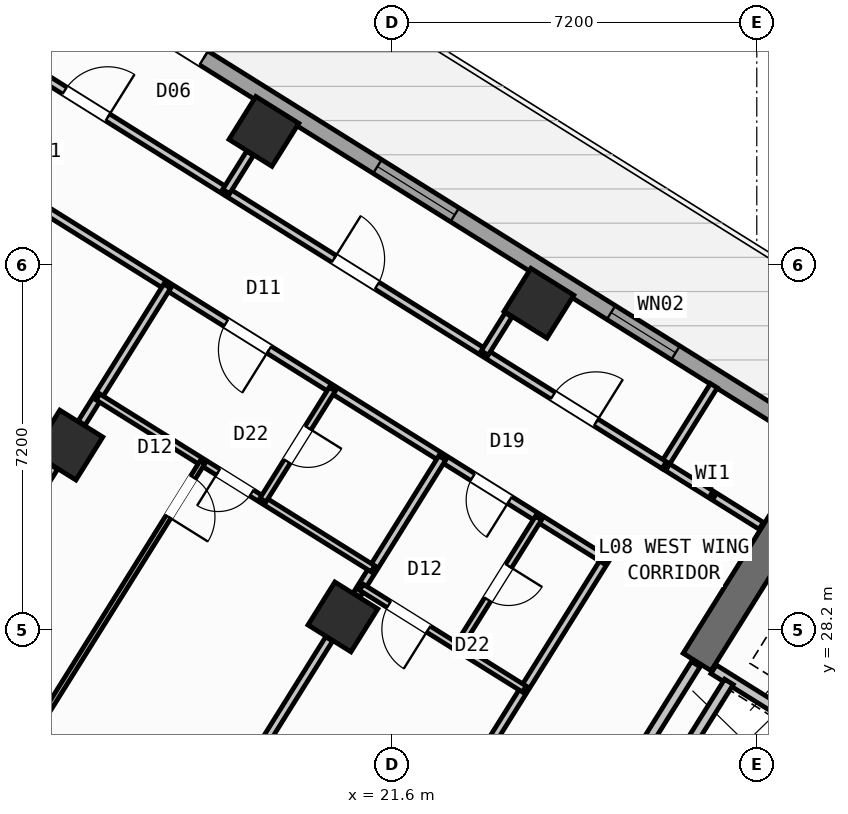
"""IFC4 building model, lengths in metres.
Left out: names, types, materials, properties, quantities, classifications, styles, units other than length and angle.
Written with IfcOpenShell. Run it as: python <this file> out.ifc"""

import sys

from ifc_helpers import new_model, si_unit, direction, frame, frame_2d, origin, origin_2d, place, context, subcontext, project, spatial, rectangle, hollow_rectangle, extrude, source, transform, mapped, element, fill, save


model = new_model("IFC4")
c1 = context("Model", 3, precision=1e-05, world=origin(), true_north=direction((0.0, 1.0)))
c2 = subcontext(c1, "Body", "Model", "MODEL_VIEW")
j1 = project(units=[si_unit("LENGTHUNIT", "METRE"), si_unit("PLANEANGLEUNIT", "RADIAN")], contexts=[c1])
p1 = place(None, origin())
s1 = spatial("IfcSite", under=j1, at=p1, CompositionType="ELEMENT")
p2 = place(p1, origin())
s2 = spatial("IfcBuilding", under=s1, at=p2, CompositionType="ELEMENT")
p3 = place(p2, frame((0.0, 0.0, 34.8)))
s3 = spatial("IfcBuildingStorey", under=s2, at=p3, CompositionType="ELEMENT", Elevation=34.8)
p4 = place(p3, frame((29.491, 30.552, 0.0), z_axis=(0.0, 0.0, 1.0), x_axis=(-0.529893103397, -0.8480644427, 0.0)))
e1 = element("IfcWall", 1, at=p4, inside=s3, PredefinedType="SHEAR", context=c2, shape_type="SweptSolid", body=[
    extrude(rectangle(XDim=3.525, YDim=0.65, at=frame_2d((1.763, 0.0))), origin(), (0.0, 0.0, 1.0), 3.35),
])
m1 = source(origin(), c2, "Body", "SweptSolid", [
    extrude(hollow_rectangle(XDim=1.0, YDim=1.0, WallThickness=0.04, at=origin_2d()), origin(), (0.0, 0.0, 1.0), 3.6),
])
for number, where, z_axis, x_axis in (
    (2, (24.5, 34.643, 0.0), (0.0, 0.0, 1.0), (-0.848, 0.53, 0.0)),
    (3, (20.632, 28.452, 0.0), (0.0, 0.0, 1.0), (-0.848, 0.53, 0.0)),
    (4, (19.073, 38.034, 0.0), (0.0, 0.0, 1.0), (-0.848, 0.53, 0.0)),
    (5, (15.205, 31.844, 0.0), (0.0, 0.0, 1.0), (-0.848, 0.53, 0.0)),
):
    element("IfcColumn", number, at=place(p3, frame(where, z_axis=z_axis, x_axis=x_axis)), inside=s3, PredefinedType="COLUMN", context=c2, shape_type="MappedRepresentation", body=[
        mapped(m1, transform((0.0, 0.0, 0.0), scale=1.0)),
    ])
p5 = place(p3, frame((14.138, 41.825, 0.0), z_axis=(0.0, 0.0, 1.0), x_axis=(0.848046498049, -0.529921821731, 0.0)))
e6 = element("IfcWall", 6, at=p5, inside=s3, PredefinedType="STANDARD", context=c2, shape_type="SweptSolid", body=[
    extrude(rectangle(XDim=31.588, YDim=0.32, at=frame_2d((15.794, 0.0))), origin(), (0.0, 0.0, 1.0), 3.35),
])
p6 = place(p5, frame((3.369, 0.0, 0.0)))
e7 = element("IfcOpeningElement", 7, at=p6, cuts=e6, PredefinedType="OPENING", context=c2, shape_type="SweptSolid", body=[
    extrude(rectangle(XDim=1.05, YDim=2.15, at=frame_2d((0.525, 1.075))), frame((0.0, 0.17, 0.0), z_axis=(0.0, -1.0, 0.0), x_axis=(1.0, 0.0, 0.0)), (0.0, 0.0, 1.0), 0.34),
])
p7 = place(p5, frame((0.946, 0.0, 0.85)))
e8 = element("IfcOpeningElement", 8, at=p7, cuts=e6, PredefinedType="OPENING", context=c2, shape_type="SweptSolid", body=[
    extrude(rectangle(XDim=1.8, YDim=1.5, at=frame_2d((0.9, 0.75))), frame((0.0, 0.17, 0.0), z_axis=(0.0, -1.0, 0.0), x_axis=(1.0, 0.0, 0.0)), (0.0, 0.0, 1.0), 0.34),
])
p8 = place(p5, frame((8.46, 0.0, 0.85)))
e9 = element("IfcOpeningElement", 9, at=p8, cuts=e6, PredefinedType="OPENING", context=c2, shape_type="SweptSolid", body=[
    extrude(rectangle(XDim=1.8, YDim=1.5, at=frame_2d((0.9, 0.75))), frame((0.0, 0.17, 0.0), z_axis=(0.0, -1.0, 0.0), x_axis=(1.0, 0.0, 0.0)), (0.0, 0.0, 1.0), 0.34),
])
p9 = place(p5, frame((13.899, 0.0, 0.85)))
e10 = element("IfcOpeningElement", 10, at=p9, cuts=e6, PredefinedType="OPENING", context=c2, shape_type="SweptSolid", body=[
    extrude(rectangle(XDim=1.5, YDim=1.5, at=frame_2d((0.75, 0.75))), frame((0.0, 0.17, 0.0), z_axis=(0.0, -1.0, 0.0), x_axis=(1.0, 0.0, 0.0)), (0.0, 0.0, 1.0), 0.34),
])
p10 = place(p5, frame((22.019, 0.0, 0.95)))
e11 = element("IfcOpeningElement", 11, at=p10, cuts=e6, PredefinedType="OPENING", context=c2, shape_type="SweptSolid", body=[
    extrude(rectangle(XDim=1.2, YDim=1.4, at=frame_2d((0.6, 0.7))), frame((0.0, 0.17, 0.0), z_axis=(0.0, -1.0, 0.0), x_axis=(1.0, 0.0, 0.0)), (0.0, 0.0, 1.0), 0.34),
])
p11 = place(p5, frame((27.569, 0.0, 0.95)))
e12 = element("IfcOpeningElement", 12, at=p11, cuts=e6, PredefinedType="OPENING", context=c2, shape_type="SweptSolid", body=[
    extrude(rectangle(XDim=1.2, YDim=1.4, at=frame_2d((0.6, 0.7))), frame((0.0, 0.17, 0.0), z_axis=(0.0, -1.0, 0.0), x_axis=(1.0, 0.0, 0.0)), (0.0, 0.0, 1.0), 0.34),
])
p12 = place(p3, frame((31.822, 24.998, 0.0), z_axis=(0.0, 0.0, 1.0), x_axis=(-0.848058348634, 0.529902856485, 0.0)))
e13 = element("IfcWall", 13, at=p12, inside=s3, PredefinedType="STANDARD", context=c2, shape_type="SweptSolid", body=[
    extrude(rectangle(XDim=4.568, YDim=0.2, at=frame_2d((2.284, 0.0))), origin(), (0.0, 0.0, 1.0), 3.34),
])
p13 = place(p3, frame((28.25, 27.17, 0.0), z_axis=(0.0, 0.0, 1.0), x_axis=(-0.529905827651, -0.848056492117, 0.0)))
e14 = element("IfcWall", 14, at=p13, inside=s3, PredefinedType="STANDARD", context=c2, shape_type="SweptSolid", body=[
    extrude(rectangle(XDim=1.65, YDim=0.2, at=frame_2d((0.825, 0.0))), origin(), (0.0, 0.0, 1.0), 3.34),
])
p14 = place(p3, frame((29.801, 26.142, 0.0), z_axis=(0.0, 0.0, 1.0), x_axis=(-0.529998940003, -0.847998304005, 0.0)))
e15 = element("IfcWall", 15, at=p14, inside=s3, PredefinedType="STANDARD", context=c2, shape_type="SweptSolid", body=[
    extrude(rectangle(XDim=1.58, YDim=0.2, at=frame_2d((0.79, 0.0))), origin(), (0.0, 0.0, 1.0), 3.34),
])
p15 = place(p3, frame((27.596, 27.52, 0.0), z_axis=(0.0, 0.0, 1.0), x_axis=(-0.529865479138, -0.848081702443, 0.0)))
e16 = element("IfcWall", 16, at=p15, inside=s3, PredefinedType="STANDARD", context=c2, shape_type="SweptSolid", body=[
    extrude(rectangle(XDim=2.96, YDim=0.2, at=frame_2d((1.48, 0.0))), origin(), (0.0, 0.0, 1.0), 3.34),
])
p16 = place(p15, frame((1.76, 0.0, 0.0)))
e17 = element("IfcOpeningElement", 17, at=p16, cuts=e16, PredefinedType="OPENING", context=c2, shape_type="SweptSolid", body=[
    extrude(rectangle(XDim=0.86, YDim=2.05, at=frame_2d((0.43, 1.025))), frame((0.0, 0.11, 0.0), z_axis=(0.0, -1.0, 0.0), x_axis=(1.0, 0.0, 0.0)), (0.0, 0.0, 1.0), 0.22),
])
p17 = place(p3, frame((28.887, 30.251, 0.0), z_axis=(0.0, 0.0, 1.0), x_axis=(-0.848040823168, 0.52993090327, 0.0)))
e18 = element("IfcWall", 18, at=p17, inside=s3, PredefinedType="PARTITIONING", context=c2, shape_type="SweptSolid", body=[
    extrude(rectangle(XDim=2.258, YDim=0.16, at=frame_2d((1.129, 0.0))), origin(), (0.0, 0.0, 1.0), 3.34),
])
p18 = place(p3, frame((27.953, 33.016, 0.0), z_axis=(0.0, 0.0, 1.0), x_axis=(-0.529880305451, -0.848072439061, 0.0)))
e19 = element("IfcWall", 19, at=p18, inside=s3, PredefinedType="PARTITIONING", context=c2, shape_type="SweptSolid", body=[
    extrude(rectangle(XDim=1.85, YDim=0.16, at=frame_2d((0.925, 0.0))), origin(), (0.0, 0.0, 1.0), 3.34),
])
p19 = place(p3, frame((25.807, 29.582, 0.0), z_axis=(0.0, 0.0, 1.0), x_axis=(-0.529918119251, -0.84804881162, 0.0)))
e20 = element("IfcWall", 20, at=p19, inside=s3, PredefinedType="PARTITIONING", context=c2, shape_type="SweptSolid", body=[
    extrude(rectangle(XDim=17.65, YDim=0.16, at=frame_2d((8.825, 0.0))), origin(), (0.0, 0.0, 1.0), 3.34),
])
p20 = place(p3, frame((26.973, 31.447, 0.0), z_axis=(0.0, 0.0, 1.0), x_axis=(-0.848048310262, 0.529918921593, 0.0)))
e21 = element("IfcWall", 21, at=p20, inside=s3, PredefinedType="PARTITIONING", context=c2, shape_type="SweptSolid", body=[
    extrude(rectangle(XDim=16.73, YDim=0.16, at=frame_2d((8.365, 0.0))), origin(), (0.0, 0.0, 1.0), 3.34),
])
p21 = place(p20, frame((1.588, 0.0, 0.0)))
e22 = element("IfcOpeningElement", 22, at=p21, cuts=e21, PredefinedType="OPENING", context=c2, shape_type="SweptSolid", body=[
    extrude(rectangle(XDim=1.0, YDim=2.1, at=frame_2d((0.5, 1.05))), frame((0.0, 0.09, 0.0), z_axis=(0.0, -1.0, 0.0), x_axis=(1.0, 0.0, 0.0)), (0.0, 0.0, 1.0), 0.18),
])
p22 = place(p20, frame((6.685, 0.0, 0.0)))
e23 = element("IfcOpeningElement", 23, at=p22, cuts=e21, PredefinedType="OPENING", context=c2, shape_type="SweptSolid", body=[
    extrude(rectangle(XDim=1.0, YDim=2.1, at=frame_2d((0.5, 1.05))), frame((0.0, 0.09, 0.0), z_axis=(0.0, -1.0, 0.0), x_axis=(1.0, 0.0, 0.0)), (0.0, 0.0, 1.0), 0.18),
])
p23 = place(p20, frame((12.951, 0.0, 0.0)))
e24 = element("IfcOpeningElement", 24, at=p23, cuts=e21, PredefinedType="OPENING", context=c2, shape_type="SweptSolid", body=[
    extrude(rectangle(XDim=1.0, YDim=2.1, at=frame_2d((0.5, 1.05))), frame((0.0, 0.09, 0.0), z_axis=(0.0, -1.0, 0.0), x_axis=(1.0, 0.0, 0.0)), (0.0, 0.0, 1.0), 0.18),
])
p24 = place(p3, frame((25.807, 29.582, 0.0), z_axis=(0.0, 0.0, 1.0), x_axis=(-0.848052408131, 0.529912363569, 0.0)))
e25 = element("IfcWall", 25, at=p24, inside=s3, PredefinedType="PARTITIONING", context=c2, shape_type="SweptSolid", body=[
    extrude(rectangle(XDim=16.73, YDim=0.16, at=frame_2d((8.365, 0.0))), origin(), (0.0, 0.0, 1.0), 3.34),
])
p25 = place(p24, frame((2.22, 0.0, 0.0)))
e26 = element("IfcOpeningElement", 26, at=p25, cuts=e25, PredefinedType="OPENING", context=c2, shape_type="SweptSolid", body=[
    extrude(rectangle(XDim=0.86, YDim=2.05, at=frame_2d((0.43, 1.025))), frame((0.0, 0.09, 0.0), z_axis=(0.0, -1.0, 0.0), x_axis=(1.0, 0.0, 0.0)), (0.0, 0.0, 1.0), 0.18),
])
p26 = place(p24, frame((7.82, 0.0, 0.0)))
e27 = element("IfcOpeningElement", 27, at=p26, cuts=e25, PredefinedType="OPENING", context=c2, shape_type="SweptSolid", body=[
    extrude(rectangle(XDim=1.0, YDim=2.1, at=frame_2d((0.5, 1.05))), frame((0.0, 0.09, 0.0), z_axis=(0.0, -1.0, 0.0), x_axis=(1.0, 0.0, 0.0)), (0.0, 0.0, 1.0), 0.18),
])
p27 = place(p24, frame((12.95, 0.0, 0.0)))
e28 = element("IfcOpeningElement", 28, at=p27, cuts=e25, PredefinedType="OPENING", context=c2, shape_type="SweptSolid", body=[
    extrude(rectangle(XDim=1.0, YDim=2.1, at=frame_2d((0.5, 1.05))), frame((0.0, 0.09, 0.0), z_axis=(0.0, -1.0, 0.0), x_axis=(1.0, 0.0, 0.0)), (0.0, 0.0, 1.0), 0.18),
])
p28 = place(p3, frame((22.593, 31.59, 0.0), z_axis=(0.0, 0.0, 1.0), x_axis=(-0.529930102756, -0.848041323399, 0.0)))
e29 = element("IfcWall", 29, at=p28, inside=s3, PredefinedType="PARTITIONING", context=c2, shape_type="SweptSolid", body=[
    extrude(rectangle(XDim=3.188, YDim=0.16, at=frame_2d((1.594, 0.0))), origin(), (0.0, 0.0, 1.0), 2.725),
])
p29 = place(p3, frame((20.361, 28.018, 0.0), z_axis=(0.0, 0.0, 1.0), x_axis=(-0.529915015264, -0.848050751193, 0.0)))
e30 = element("IfcWall", 30, at=p29, inside=s3, PredefinedType="PARTITIONING", context=c2, shape_type="SweptSolid", body=[
    extrude(rectangle(XDim=6.276, YDim=0.16, at=frame_2d((3.138, 0.0))), origin(), (0.0, 0.0, 1.0), 2.725),
])
p30 = place(p3, frame((24.212, 27.029, 0.0), z_axis=(0.0, 0.0, 1.0), x_axis=(-0.84803087207, 0.529946827537, 0.0)))
e31 = element("IfcWall", 31, at=p30, inside=s3, PredefinedType="PLUMBINGWALL", context=c2, shape_type="SweptSolid", body=[
    extrude(rectangle(XDim=3.79, YDim=0.14, at=frame_2d((1.895, 0.0))), origin(), (0.0, 0.0, 1.0), 3.34),
])
p31 = place(p30, frame((2.23, 0.0, 0.0)))
e32 = element("IfcOpeningElement", 32, at=p31, cuts=e31, PredefinedType="OPENING", context=c2, shape_type="SweptSolid", body=[
    extrude(rectangle(XDim=0.92, YDim=2.08, at=frame_2d((0.46, 1.04))), frame((0.0, 0.08, 0.0), z_axis=(0.0, -1.0, 0.0), x_axis=(1.0, 0.0, 0.0)), (0.0, 0.0, 1.0), 0.16),
])
p32 = place(p3, frame((24.492, 30.403, 0.0), z_axis=(0.0, 0.0, 1.0), x_axis=(-0.529977067289, -0.848011974059, 0.0)))
e33 = element("IfcWall", 33, at=p32, inside=s3, PredefinedType="PLUMBINGWALL", context=c2, shape_type="SweptSolid", body=[
    extrude(rectangle(XDim=3.01, YDim=0.14, at=frame_2d((1.505, 0.0))), origin(), (0.0, 0.0, 1.0), 2.995),
])
p33 = place(p32, frame((1.115, 0.0, 0.0)))
e34 = element("IfcOpeningElement", 34, at=p33, cuts=e33, PredefinedType="OPENING", context=c2, shape_type="SweptSolid", body=[
    extrude(rectangle(XDim=0.78, YDim=2.05, at=frame_2d((0.39, 1.025))), frame((0.0, 0.08, 0.0), z_axis=(0.0, -1.0, 0.0), x_axis=(1.0, 0.0, 0.0)), (0.0, 0.0, 1.0), 0.16),
])
p34 = place(p3, frame((17.165, 34.981, 0.0), z_axis=(0.0, 0.0, 1.0), x_axis=(-0.529930102756, -0.848041323399, 0.0)))
e35 = element("IfcWall", 35, at=p34, inside=s3, PredefinedType="PARTITIONING", context=c2, shape_type="SweptSolid", body=[
    extrude(rectangle(XDim=3.188, YDim=0.16, at=frame_2d((1.594, 0.0))), origin(), (0.0, 0.0, 1.0), 2.725),
])
p35 = place(p3, frame((14.933, 31.409, 0.0), z_axis=(0.0, 0.0, 1.0), x_axis=(-0.529897533635, -0.848061674554, 0.0)))
e36 = element("IfcWall", 36, at=p35, inside=s3, PredefinedType="PARTITIONING", context=c2, shape_type="SweptSolid", body=[
    extrude(rectangle(XDim=6.276, YDim=0.16, at=frame_2d((3.138, 0.0))), origin(), (0.0, 0.0, 1.0), 2.725),
])
p36 = place(p3, frame((21.226, 29.402, 0.0), z_axis=(0.0, 0.0, 1.0), x_axis=(-0.848039019877, 0.529933789039, 0.0)))
e37 = element("IfcWall", 37, at=p36, inside=s3, PredefinedType="PLUMBINGWALL", context=c2, shape_type="SweptSolid", body=[
    extrude(rectangle(XDim=6.4, YDim=0.14, at=frame_2d((3.2, 0.0))), origin(), (0.0, 0.0, 1.0), 3.34),
])
p37 = place(p36, frame((2.824, 0.0, 0.0)))
e38 = element("IfcOpeningElement", 38, at=p37, cuts=e37, PredefinedType="OPENING", context=c2, shape_type="SweptSolid", body=[
    extrude(rectangle(XDim=0.78, YDim=2.05, at=frame_2d((0.39, 1.025))), frame((0.0, 0.08, 0.0), z_axis=(0.0, -1.0, 0.0), x_axis=(1.0, 0.0, 0.0)), (0.0, 0.0, 1.0), 0.16),
])
p38 = place(p3, frame((20.422, 32.947, 0.0), z_axis=(0.0, 0.0, 1.0), x_axis=(-0.529913878929, -0.848051461244, 0.0)))
e39 = element("IfcWall", 39, at=p38, inside=s3, PredefinedType="PLUMBINGWALL", context=c2, shape_type="SweptSolid", body=[
    extrude(rectangle(XDim=2.58, YDim=0.14, at=frame_2d((1.29, 0.0))), origin(), (0.0, 0.0, 1.0), 3.34),
])
p39 = place(p38, frame((0.9, 0.0, 0.0)))
e40 = element("IfcOpeningElement", 40, at=p39, cuts=e39, PredefinedType="OPENING", context=c2, shape_type="SweptSolid", body=[
    extrude(rectangle(XDim=0.78, YDim=2.05, at=frame_2d((0.39, 1.025))), frame((0.0, 0.08, 0.0), z_axis=(0.0, -1.0, 0.0), x_axis=(1.0, 0.0, 0.0)), (0.0, 0.0, 1.0), 0.16),
])
p40 = place(p3, frame((17.861, 31.505, 0.0), z_axis=(0.0, 0.0, 1.0), x_axis=(-0.529928839727, -0.848042112649, 0.0)))
e41 = element("IfcWall", 41, at=p40, inside=s3, PredefinedType="PARTITIONING", context=c2, shape_type="SweptSolid", body=[
    extrude(rectangle(XDim=15.34, YDim=0.11, at=frame_2d((7.67, 0.0))), origin(), (0.0, 0.0, 1.0), 3.34),
])
p41 = place(p40, frame((0.35, 0.0, 0.0)))
e42 = element("IfcOpeningElement", 42, at=p41, cuts=e41, PredefinedType="OPENING", context=c2, shape_type="SweptSolid", body=[
    extrude(rectangle(XDim=0.92, YDim=2.08, at=frame_2d((0.46, 1.04))), frame((0.0, 0.065, 0.0), z_axis=(0.0, -1.0, 0.0), x_axis=(1.0, 0.0, 0.0)), (0.0, 0.0, 1.0), 0.13),
])
p42 = place(p3, frame((23.901, 34.414, 0.0), z_axis=(0.0, 0.0, 1.0), x_axis=(-0.529776512202, -0.848137280821, 0.0)))
e43 = element("IfcWall", 43, at=p42, inside=s3, PredefinedType="PARTITIONING", context=c2, shape_type="SweptSolid", body=[
    extrude(rectangle(XDim=0.888, YDim=0.16, at=frame_2d((0.444, 0.0))), origin(), (0.0, 0.0, 1.0), 3.34),
])
p43 = place(p3, frame((18.799, 37.602, 0.0), z_axis=(0.0, 0.0, 1.0), x_axis=(-0.529974231203, -0.848013746505, 0.0)))
e44 = element("IfcWall", 44, at=p43, inside=s3, PredefinedType="PARTITIONING", context=c2, shape_type="SweptSolid", body=[
    extrude(rectangle(XDim=0.888, YDim=0.16, at=frame_2d((0.444, 0.0))), origin(), (0.0, 0.0, 1.0), 2.725),
])
m2 = source(origin(), c2, "Body", "SweptSolid", [
    extrude(rectangle(XDim=1.05, YDim=2.15, at=frame_2d((0.525, 1.075))), frame((0.0, 0.025, 0.0), z_axis=(0.0, -1.0, 0.0), x_axis=(1.0, 0.0, 0.0)), (0.0, 0.0, 1.0), 0.05),
])
p44 = place(p6, origin())
e45 = element("IfcDoor", 45, at=p44, inside=s3, OperationType="SINGLE_SWING_RIGHT", PredefinedType="DOOR", context=c2, shape_type="MappedRepresentation", body=[
    mapped(m2, transform((0.0, 0.0, 0.0), scale=1.0)),
])
fill(e7, e45)
m3 = source(origin(), c2, "Body", "SweptSolid", [
    extrude(rectangle(XDim=1.8, YDim=1.5, at=frame_2d((0.9, 0.75))), frame((0.0, 0.03, 0.0), z_axis=(0.0, -1.0, 0.0), x_axis=(1.0, 0.0, 0.0)), (0.0, 0.0, 1.0), 0.06),
])
p45 = place(p8, origin())
e46 = element("IfcWindow", 46, at=p45, inside=s3, PartitioningType="SINGLE_PANEL", PredefinedType="WINDOW", context=c2, shape_type="MappedRepresentation", body=[
    mapped(m3, transform((0.0, 0.0, 0.0), scale=1.0)),
])
fill(e9, e46)
m4 = source(origin(), c2, "Body", "SweptSolid", [
    extrude(rectangle(XDim=1.5, YDim=1.5, at=frame_2d((0.75, 0.75))), frame((0.0, 0.03, 0.0), z_axis=(0.0, -1.0, 0.0), x_axis=(1.0, 0.0, 0.0)), (0.0, 0.0, 1.0), 0.06),
])
p46 = place(p9, origin())
e47 = element("IfcWindow", 47, at=p46, inside=s3, PartitioningType="SINGLE_PANEL", PredefinedType="WINDOW", context=c2, shape_type="MappedRepresentation", body=[
    mapped(m4, transform((0.0, 0.0, 0.0), scale=1.0)),
])
fill(e10, e47)
m5 = source(origin(), c2, "Body", "SweptSolid", [
    extrude(rectangle(XDim=0.86, YDim=2.05, at=frame_2d((0.43, 1.025))), frame((0.0, 0.025, 0.0), z_axis=(0.0, -1.0, 0.0), x_axis=(1.0, 0.0, 0.0)), (0.0, 0.0, 1.0), 0.05),
])
p47 = place(p25, origin())
e48 = element("IfcDoor", 48, at=p47, inside=s3, OperationType="SINGLE_SWING_LEFT", PredefinedType="DOOR", context=c2, shape_type="MappedRepresentation", body=[
    mapped(m5, transform((0.0, 0.0, 0.0), scale=1.0)),
])
fill(e26, e48)
m6 = source(origin(), c2, "Body", "SweptSolid", [
    extrude(rectangle(XDim=0.92, YDim=2.08, at=frame_2d((0.46, 1.04))), frame((0.0, 0.025, 0.0), z_axis=(0.0, -1.0, 0.0), x_axis=(1.0, 0.0, 0.0)), (0.0, 0.0, 1.0), 0.05),
])
p48 = place(p31, origin())
e49 = element("IfcDoor", 49, at=p48, inside=s3, OperationType="SINGLE_SWING_LEFT", PredefinedType="DOOR", context=c2, shape_type="MappedRepresentation", body=[
    mapped(m6, transform((0.0, 0.0, 0.0), scale=1.0)),
])
fill(e32, e49)
m7 = source(origin(), c2, "Body", "SweptSolid", [
    extrude(rectangle(XDim=0.78, YDim=2.05, at=frame_2d((0.39, 1.025))), frame((0.0, 0.025, 0.0), z_axis=(0.0, -1.0, 0.0), x_axis=(1.0, 0.0, 0.0)), (0.0, 0.0, 1.0), 0.05),
])
p49 = place(p33, origin())
e50 = element("IfcDoor", 50, at=p49, inside=s3, OperationType="SINGLE_SWING_LEFT", PredefinedType="DOOR", context=c2, shape_type="MappedRepresentation", body=[
    mapped(m7, transform((0.0, 0.0, 0.0), scale=1.0)),
])
fill(e34, e50)
p50 = place(p41, origin())
e51 = element("IfcDoor", 51, at=p50, inside=s3, OperationType="SINGLE_SWING_RIGHT", PredefinedType="DOOR", context=c2, shape_type="MappedRepresentation", body=[
    mapped(m6, transform((0.0, 0.0, 0.0), scale=1.0)),
])
fill(e42, e51)
m8 = source(origin(), c2, "Body", "SweptSolid", [
    extrude(rectangle(XDim=1.0, YDim=2.1, at=frame_2d((0.5, 1.05))), frame((0.0, 0.025, 0.0), z_axis=(0.0, -1.0, 0.0), x_axis=(1.0, 0.0, 0.0)), (0.0, 0.0, 1.0), 0.05),
])
p51 = place(p26, origin())
e52 = element("IfcDoor", 52, at=p51, inside=s3, OperationType="SINGLE_SWING_LEFT", PredefinedType="DOOR", context=c2, shape_type="MappedRepresentation", body=[
    mapped(m8, transform((0.0, 0.0, 0.0), scale=1.0)),
])
fill(e27, e52)
p52 = place(p37, origin())
e53 = element("IfcDoor", 53, at=p52, inside=s3, OperationType="SINGLE_SWING_RIGHT", PredefinedType="DOOR", context=c2, shape_type="MappedRepresentation", body=[
    mapped(m7, transform((0.0, 0.0, 0.0), scale=1.0)),
])
fill(e38, e53)
p53 = place(p39, origin())
e54 = element("IfcDoor", 54, at=p53, inside=s3, OperationType="SINGLE_SWING_LEFT", PredefinedType="DOOR", context=c2, shape_type="MappedRepresentation", body=[
    mapped(m7, transform((0.0, 0.0, 0.0), scale=1.0)),
])
fill(e40, e54)
p54 = place(p21, frame((1.0, 0.0, 0.0), z_axis=(0.0, 0.0, 1.0), x_axis=(-1.0, 0.0, 0.0)))
e55 = element("IfcDoor", 55, at=p54, inside=s3, OperationType="SINGLE_SWING_RIGHT", PredefinedType="DOOR", context=c2, shape_type="MappedRepresentation", body=[
    mapped(m8, transform((0.0, 0.0, 0.0), scale=1.0)),
])
fill(e22, e55)
p55 = place(p22, frame((1.0, 0.0, 0.0), z_axis=(0.0, 0.0, 1.0), x_axis=(-1.0, 0.0, 0.0)))
e56 = element("IfcDoor", 56, at=p55, inside=s3, OperationType="SINGLE_SWING_LEFT", PredefinedType="DOOR", context=c2, shape_type="MappedRepresentation", body=[
    mapped(m8, transform((0.0, 0.0, 0.0), scale=1.0)),
])
fill(e23, e56)
p56 = place(p23, frame((1.0, 0.0, 0.0), z_axis=(0.0, 0.0, 1.0), x_axis=(-1.0, 0.0, 0.0)))
e57 = element("IfcDoor", 57, at=p56, inside=s3, OperationType="SINGLE_SWING_RIGHT", PredefinedType="DOOR", context=c2, shape_type="MappedRepresentation", body=[
    mapped(m8, transform((0.0, 0.0, 0.0), scale=1.0)),
])
fill(e24, e57)
save(model, sys.argv[1])
